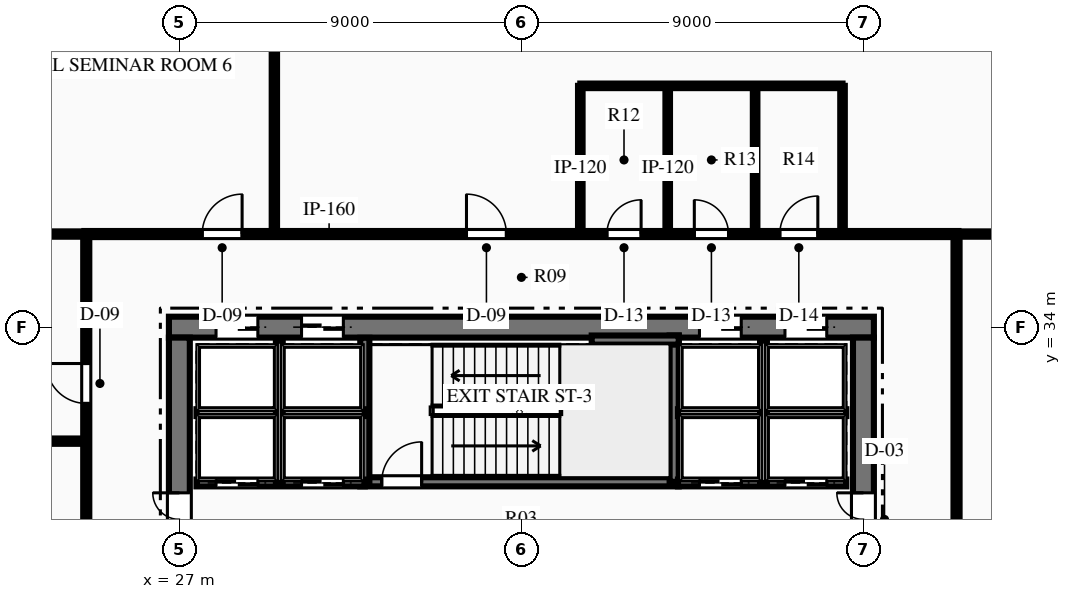
"""IFC4 building model, lengths in metres.
Left out: names, types, materials, properties, quantities, classifications, styles, units other than length and angle.
Written with IfcOpenShell. Run it as: python <this file> out.ifc"""

import sys

from ifc_helpers import new_model, si_unit, direction, frame, frame_2d, origin, place, context, subcontext, project, spatial, rectangle, extrude, element, fill, save


model = new_model("IFC4")
c1 = context("Model", 3, precision=1e-05, world=origin(), true_north=direction((0.0, 1.0)))
c2 = subcontext(c1, "Body", "Model", "MODEL_VIEW")
j1 = project(units=[si_unit("LENGTHUNIT", "METRE"), si_unit("PLANEANGLEUNIT", "RADIAN")], contexts=[c1])
p1 = place(None, origin())
s1 = spatial("IfcSite", under=j1, at=p1, CompositionType="ELEMENT")
p2 = place(p1, origin())
s2 = spatial("IfcBuilding", under=s1, at=p2, CompositionType="ELEMENT")
p3 = place(p2, frame((0.0, 0.0, 131.7)))
s3 = spatial("IfcBuildingStorey", under=s2, at=p3, CompositionType="ELEMENT", Elevation=131.7)
p4 = place(p3, frame((26.725, 34.0, 0.0), z_axis=(0.0, 0.0, 1.0), x_axis=(1.0, 0.0, 0.0)))
e1 = element("IfcWall", 1, at=p4, inside=s3, PredefinedType="SHEAR", context=c2, shape_type="SweptSolid", body=[
    extrude(rectangle(XDim=18.55, YDim=0.55, at=frame_2d((9.275, 0.0))), origin(), (0.0, 0.0, 1.0), 4.5),
])
p5 = place(p4, frame((1.24, 0.0, 0.0)))
e2 = element("IfcOpeningElement", 2, at=p5, cuts=e1, PredefinedType="OPENING", context=c2, shape_type="SweptSolid", body=[
    extrude(rectangle(XDim=1.1, YDim=2.15, at=frame_2d((0.55, 1.075))), frame((0.0, 0.285, 0.0), z_axis=(0.0, -1.0, 0.0), x_axis=(1.0, 0.0, 0.0)), (0.0, 0.0, 1.0), 0.57),
])
p6 = place(p4, frame((3.49, 0.0, 0.0)))
e3 = element("IfcOpeningElement", 3, at=p6, cuts=e1, PredefinedType="OPENING", context=c2, shape_type="SweptSolid", body=[
    extrude(rectangle(XDim=1.1, YDim=2.15, at=frame_2d((0.55, 1.075))), frame((0.0, 0.285, 0.0), z_axis=(0.0, -1.0, 0.0), x_axis=(1.0, 0.0, 0.0)), (0.0, 0.0, 1.0), 0.57),
])
p7 = place(p4, frame((13.96, 0.0, 0.0)))
e4 = element("IfcOpeningElement", 4, at=p7, cuts=e1, PredefinedType="OPENING", context=c2, shape_type="SweptSolid", body=[
    extrude(rectangle(XDim=1.1, YDim=2.15, at=frame_2d((0.55, 1.075))), frame((0.0, 0.285, 0.0), z_axis=(0.0, -1.0, 0.0), x_axis=(1.0, 0.0, 0.0)), (0.0, 0.0, 1.0), 0.57),
])
p8 = place(p4, frame((16.21, 0.0, 0.0)))
e5 = element("IfcOpeningElement", 5, at=p8, cuts=e1, PredefinedType="OPENING", context=c2, shape_type="SweptSolid", body=[
    extrude(rectangle(XDim=1.1, YDim=2.15, at=frame_2d((0.55, 1.075))), frame((0.0, 0.285, 0.0), z_axis=(0.0, -1.0, 0.0), x_axis=(1.0, 0.0, 0.0)), (0.0, 0.0, 1.0), 0.57),
])
p9 = place(p3, frame((27.0, 18.275, 0.0), z_axis=(0.0, 0.0, 1.0), x_axis=(0.0, 1.0, 0.0)))
e6 = element("IfcWall", 6, at=p9, inside=s3, PredefinedType="SHEAR", context=c2, shape_type="SweptSolid", body=[
    extrude(rectangle(XDim=15.45, YDim=0.55, at=frame_2d((7.725, 0.0))), origin(), (0.0, 0.0, 1.0), 4.5),
])
p10 = place(p9, frame((9.965, 0.0, 0.0)))
e7 = element("IfcOpeningElement", 7, at=p10, cuts=e6, PredefinedType="OPENING", context=c2, shape_type="SweptSolid", body=[
    extrude(rectangle(XDim=1.4, YDim=2.2, at=frame_2d((0.7, 1.1))), frame((0.0, 0.285, 0.0), z_axis=(0.0, -1.0, 0.0), x_axis=(1.0, 0.0, 0.0)), (0.0, 0.0, 1.0), 0.57),
])
p11 = place(p3, frame((45.0, 18.275, 0.0), z_axis=(0.0, 0.0, 1.0), x_axis=(0.0, 1.0, 0.0)))
e8 = element("IfcWall", 8, at=p11, inside=s3, PredefinedType="SHEAR", context=c2, shape_type="SweptSolid", body=[
    extrude(rectangle(XDim=15.45, YDim=0.55, at=frame_2d((7.725, 0.0))), origin(), (0.0, 0.0, 1.0), 4.5),
])
p12 = place(p11, frame((9.965, 0.0, 0.0)))
e9 = element("IfcOpeningElement", 9, at=p12, cuts=e8, PredefinedType="OPENING", context=c2, shape_type="SweptSolid", body=[
    extrude(rectangle(XDim=1.4, YDim=2.2, at=frame_2d((0.7, 1.1))), frame((0.0, 0.285, 0.0), z_axis=(0.0, -1.0, 0.0), x_axis=(1.0, 0.0, 0.0)), (0.0, 0.0, 1.0), 0.57),
])
p13 = place(p3, frame((31.76, 29.93, 0.0), z_axis=(0.0, 0.0, 1.0), x_axis=(1.0, 0.0, 0.0)))
e10 = element("IfcWall", 10, at=p13, inside=s3, PredefinedType="SHEAR", context=c2, shape_type="SweptSolid", body=[
    extrude(rectangle(XDim=8.38, YDim=0.24, at=frame_2d((4.19, 0.0))), origin(), (0.0, 0.0, 1.0), 4.5),
])
p14 = place(p13, frame((0.565, 0.0, 0.0)))
e11 = element("IfcOpeningElement", 11, at=p14, cuts=e10, PredefinedType="OPENING", context=c2, shape_type="SweptSolid", body=[
    extrude(rectangle(XDim=1.05, YDim=2.15, at=frame_2d((0.525, 1.075))), frame((0.0, 0.13, 0.0), z_axis=(0.0, -1.0, 0.0), x_axis=(1.0, 0.0, 0.0)), (0.0, 0.0, 1.0), 0.26),
])
p15 = place(p3, frame((31.88, 29.93, 0.0), z_axis=(0.0, 0.0, 1.0), x_axis=(0.0, 1.0, 0.0)))
e12 = element("IfcWall", 12, at=p15, inside=s3, PredefinedType="SHEAR", context=c2, shape_type="SweptSolid", body=[
    extrude(rectangle(XDim=3.79, YDim=0.24, at=frame_2d((1.895, 0.0))), origin(), (0.0, 0.0, 1.0), 4.5),
])
p16 = place(p3, frame((40.02, 29.93, 0.0), z_axis=(0.0, 0.0, 1.0), x_axis=(0.0, 1.0, 0.0)))
e13 = element("IfcWall", 13, at=p16, inside=s3, PredefinedType="SHEAR", context=c2, shape_type="SweptSolid", body=[
    extrude(rectangle(XDim=3.85, YDim=0.24, at=frame_2d((1.925, 0.0))), origin(), (0.0, 0.0, 1.0), 4.5),
])
p17 = place(p3, frame((37.85, 33.66, 0.0), z_axis=(0.0, 0.0, 1.0), x_axis=(1.0, 0.0, 0.0)))
e14 = element("IfcWall", 14, at=p17, inside=s3, PredefinedType="SHEAR", context=c2, shape_type="SweptSolid", body=[
    extrude(rectangle(XDim=2.29, YDim=0.24, at=frame_2d((1.145, 0.0))), origin(), (0.0, 0.0, 1.0), 4.5),
])
p18 = place(p3, frame((27.45, 29.9, 0.0), z_axis=(0.0, 0.0, 1.0), x_axis=(1.0, 0.0, 0.0)))
e15 = element("IfcWall", 15, at=p18, inside=s3, PredefinedType="PARTITIONING", context=c2, shape_type="SweptSolid", body=[
    extrude(rectangle(XDim=4.43, YDim=0.18, at=frame_2d((2.215, 0.0))), origin(), (0.0, 0.0, 1.0), 4.1),
])
p19 = place(p18, frame((0.515, 0.0, 0.0)))
e16 = element("IfcOpeningElement", 16, at=p19, cuts=e15, PredefinedType="OPENING", context=c2, shape_type="SweptSolid", body=[
    extrude(rectangle(XDim=1.1, YDim=2.15, at=frame_2d((0.55, 1.075))), frame((0.0, 0.1, 0.0), z_axis=(0.0, -1.0, 0.0), x_axis=(1.0, 0.0, 0.0)), (0.0, 0.0, 1.0), 0.2),
])
p20 = place(p18, frame((2.765, 0.0, 0.0)))
e17 = element("IfcOpeningElement", 17, at=p20, cuts=e15, PredefinedType="OPENING", context=c2, shape_type="SweptSolid", body=[
    extrude(rectangle(XDim=1.1, YDim=2.15, at=frame_2d((0.55, 1.075))), frame((0.0, 0.1, 0.0), z_axis=(0.0, -1.0, 0.0), x_axis=(1.0, 0.0, 0.0)), (0.0, 0.0, 1.0), 0.2),
])
p21 = place(p3, frame((27.45, 31.75, 0.0), z_axis=(0.0, 0.0, 1.0), x_axis=(1.0, 0.0, 0.0)))
e18 = element("IfcWall", 18, at=p21, inside=s3, PredefinedType="PARTITIONING", context=c2, shape_type="SweptSolid", body=[
    extrude(rectangle(XDim=4.43, YDim=0.18, at=frame_2d((2.215, 0.0))), origin(), (0.0, 0.0, 1.0), 4.1),
])
p22 = place(p3, frame((29.63, 29.9, 0.0), z_axis=(0.0, 0.0, 1.0), x_axis=(0.0, 1.0, 0.0)))
e19 = element("IfcWall", 19, at=p22, inside=s3, PredefinedType="PARTITIONING", context=c2, shape_type="SweptSolid", body=[
    extrude(rectangle(XDim=3.75, YDim=0.18, at=frame_2d((1.875, 0.0))), origin(), (0.0, 0.0, 1.0), 4.1),
])
p23 = place(p3, frame((40.12, 29.9, 0.0), z_axis=(0.0, 0.0, 1.0), x_axis=(1.0, 0.0, 0.0)))
e20 = element("IfcWall", 20, at=p23, inside=s3, PredefinedType="PARTITIONING", context=c2, shape_type="SweptSolid", body=[
    extrude(rectangle(XDim=4.43, YDim=0.18, at=frame_2d((2.215, 0.0))), origin(), (0.0, 0.0, 1.0), 4.1),
])
p24 = place(p23, frame((0.565, 0.0, 0.0)))
e21 = element("IfcOpeningElement", 21, at=p24, cuts=e20, PredefinedType="OPENING", context=c2, shape_type="SweptSolid", body=[
    extrude(rectangle(XDim=1.1, YDim=2.15, at=frame_2d((0.55, 1.075))), frame((0.0, 0.1, 0.0), z_axis=(0.0, -1.0, 0.0), x_axis=(1.0, 0.0, 0.0)), (0.0, 0.0, 1.0), 0.2),
])
p25 = place(p23, frame((2.815, 0.0, 0.0)))
e22 = element("IfcOpeningElement", 22, at=p25, cuts=e20, PredefinedType="OPENING", context=c2, shape_type="SweptSolid", body=[
    extrude(rectangle(XDim=1.1, YDim=2.15, at=frame_2d((0.55, 1.075))), frame((0.0, 0.1, 0.0), z_axis=(0.0, -1.0, 0.0), x_axis=(1.0, 0.0, 0.0)), (0.0, 0.0, 1.0), 0.2),
])
p26 = place(p3, frame((40.12, 31.75, 0.0), z_axis=(0.0, 0.0, 1.0), x_axis=(1.0, 0.0, 0.0)))
e23 = element("IfcWall", 23, at=p26, inside=s3, PredefinedType="PARTITIONING", context=c2, shape_type="SweptSolid", body=[
    extrude(rectangle(XDim=4.43, YDim=0.18, at=frame_2d((2.215, 0.0))), origin(), (0.0, 0.0, 1.0), 4.1),
])
p27 = place(p3, frame((42.37, 29.9, 0.0), z_axis=(0.0, 0.0, 1.0), x_axis=(0.0, 1.0, 0.0)))
e24 = element("IfcWall", 24, at=p27, inside=s3, PredefinedType="PARTITIONING", context=c2, shape_type="SweptSolid", body=[
    extrude(rectangle(XDim=3.75, YDim=0.18, at=frame_2d((1.875, 0.0))), origin(), (0.0, 0.0, 1.0), 4.1),
])
p28 = place(p3, frame((24.5, 36.45, 0.0), z_axis=(0.0, 0.0, 1.0), x_axis=(1.0, 0.0, 0.0)))
e25 = element("IfcWall", 25, at=p28, inside=s3, PredefinedType="PARTITIONING", context=c2, shape_type="SweptSolid", body=[
    extrude(rectangle(XDim=23.0, YDim=0.16, at=frame_2d((11.5, 0.0))), origin(), (0.0, 0.0, 1.0), 4.1),
])
p29 = place(p28, frame((13.75, 0.0, 0.0)))
e26 = element("IfcOpeningElement", 26, at=p29, cuts=e25, PredefinedType="OPENING", context=c2, shape_type="SweptSolid", body=[
    extrude(rectangle(XDim=0.9, YDim=2.15, at=frame_2d((0.45, 1.075))), frame((0.0, 0.09, 0.0), z_axis=(0.0, -1.0, 0.0), x_axis=(1.0, 0.0, 0.0)), (0.0, 0.0, 1.0), 0.18),
])
p30 = place(p28, frame((16.05, 0.0, 0.0)))
e27 = element("IfcOpeningElement", 27, at=p30, cuts=e25, PredefinedType="OPENING", context=c2, shape_type="SweptSolid", body=[
    extrude(rectangle(XDim=0.9, YDim=2.15, at=frame_2d((0.45, 1.075))), frame((0.0, 0.09, 0.0), z_axis=(0.0, -1.0, 0.0), x_axis=(1.0, 0.0, 0.0)), (0.0, 0.0, 1.0), 0.18),
])
p31 = place(p28, frame((18.3, 0.0, 0.0)))
e28 = element("IfcOpeningElement", 28, at=p31, cuts=e25, PredefinedType="OPENING", context=c2, shape_type="SweptSolid", body=[
    extrude(rectangle(XDim=1.0, YDim=2.15, at=frame_2d((0.5, 1.075))), frame((0.0, 0.09, 0.0), z_axis=(0.0, -1.0, 0.0), x_axis=(1.0, 0.0, 0.0)), (0.0, 0.0, 1.0), 0.18),
])
p32 = place(p28, frame((3.101, 0.0, 0.0)))
e29 = element("IfcOpeningElement", 29, at=p32, cuts=e25, PredefinedType="OPENING", context=c2, shape_type="SweptSolid", body=[
    extrude(rectangle(XDim=1.05, YDim=2.15, at=frame_2d((0.525, 1.075))), frame((0.0, 0.09, 0.0), z_axis=(0.0, -1.0, 0.0), x_axis=(1.0, 0.0, 0.0)), (0.0, 0.0, 1.0), 0.18),
])
p33 = place(p28, frame((10.055, 0.0, 0.0)))
e30 = element("IfcOpeningElement", 30, at=p33, cuts=e25, PredefinedType="OPENING", context=c2, shape_type="SweptSolid", body=[
    extrude(rectangle(XDim=1.05, YDim=2.15, at=frame_2d((0.525, 1.075))), frame((0.0, 0.09, 0.0), z_axis=(0.0, -1.0, 0.0), x_axis=(1.0, 0.0, 0.0)), (0.0, 0.0, 1.0), 0.18),
])
p34 = place(p3, frame((24.55, 15.55, 0.0), z_axis=(0.0, 0.0, 1.0), x_axis=(0.0, 1.0, 0.0)))
e31 = element("IfcWall", 31, at=p34, inside=s3, PredefinedType="PARTITIONING", context=c2, shape_type="SweptSolid", body=[
    extrude(rectangle(XDim=20.9, YDim=0.16, at=frame_2d((10.45, 0.0))), origin(), (0.0, 0.0, 1.0), 4.1),
])
p35 = place(p34, frame((5.107, 0.0, 0.0)))
e32 = element("IfcOpeningElement", 32, at=p35, cuts=e31, PredefinedType="OPENING", context=c2, shape_type="SweptSolid", body=[
    extrude(rectangle(XDim=1.05, YDim=2.15, at=frame_2d((0.525, 1.075))), frame((0.0, 0.09, 0.0), z_axis=(0.0, -1.0, 0.0), x_axis=(1.0, 0.0, 0.0)), (0.0, 0.0, 1.0), 0.18),
])
p36 = place(p34, frame((12.155, 0.0, 0.0)))
e33 = element("IfcOpeningElement", 33, at=p36, cuts=e31, PredefinedType="OPENING", context=c2, shape_type="SweptSolid", body=[
    extrude(rectangle(XDim=1.05, YDim=2.15, at=frame_2d((0.525, 1.075))), frame((0.0, 0.09, 0.0), z_axis=(0.0, -1.0, 0.0), x_axis=(1.0, 0.0, 0.0)), (0.0, 0.0, 1.0), 0.18),
])
p37 = place(p34, frame((16.443, 0.0, 0.0)))
e34 = element("IfcOpeningElement", 34, at=p37, cuts=e31, PredefinedType="OPENING", context=c2, shape_type="SweptSolid", body=[
    extrude(rectangle(XDim=1.05, YDim=2.15, at=frame_2d((0.525, 1.075))), frame((0.0, 0.09, 0.0), z_axis=(0.0, -1.0, 0.0), x_axis=(1.0, 0.0, 0.0)), (0.0, 0.0, 1.0), 0.18),
])
p38 = place(p3, frame((47.45, 15.55, 0.0), z_axis=(0.0, 0.0, 1.0), x_axis=(0.0, 1.0, 0.0)))
e35 = element("IfcWall", 35, at=p38, inside=s3, PredefinedType="PARTITIONING", context=c2, shape_type="SweptSolid", body=[
    extrude(rectangle(XDim=20.9, YDim=0.16, at=frame_2d((10.45, 0.0))), origin(), (0.0, 0.0, 1.0), 4.1),
])
p39 = place(p38, frame((7.417, 0.0, 0.0)))
e36 = element("IfcOpeningElement", 36, at=p39, cuts=e35, PredefinedType="OPENING", context=c2, shape_type="SweptSolid", body=[
    extrude(rectangle(XDim=1.05, YDim=2.15, at=frame_2d((0.525, 1.075))), frame((0.0, 0.09, 0.0), z_axis=(0.0, -1.0, 0.0), x_axis=(1.0, 0.0, 0.0)), (0.0, 0.0, 1.0), 0.18),
])
for number, where, z_axis, x_axis in (
    (37, (37.55, 36.45, 0.0), (0.0, 0.0, 1.0), (0.0, 1.0, 0.0)),
    (38, (39.85, 36.45, 0.0), (0.0, 0.0, 1.0), (0.0, 1.0, 0.0)),
    (39, (42.15, 36.45, 0.0), (0.0, 0.0, 1.0), (0.0, 1.0, 0.0)),
):
    element("IfcWall", number, at=place(p3, frame(where, z_axis=z_axis, x_axis=x_axis)), inside=s3, PredefinedType="PARTITIONING", context=c2, shape_type="SweptSolid", body=[
        extrude(rectangle(XDim=3.9, YDim=0.12, at=frame_2d((1.95, 0.0))), origin(), (0.0, 0.0, 1.0), 4.1),
    ])
p40 = place(p3, frame((44.45, 36.45, 0.0), z_axis=(0.0, 0.0, 1.0), x_axis=(0.0, 1.0, 0.0)))
e40 = element("IfcWall", 40, at=p40, inside=s3, PredefinedType="PARTITIONING", context=c2, shape_type="SweptSolid", body=[
    extrude(rectangle(XDim=3.9, YDim=0.12, at=frame_2d((1.95, 0.0))), origin(), (0.0, 0.0, 1.0), 2.595),
])
p41 = place(p3, frame((37.55, 40.35, 0.0), z_axis=(0.0, 0.0, 1.0), x_axis=(1.0, 0.0, 0.0)))
e41 = element("IfcWall", 41, at=p41, inside=s3, PredefinedType="PARTITIONING", context=c2, shape_type="SweptSolid", body=[
    extrude(rectangle(XDim=6.9, YDim=0.12, at=frame_2d((3.45, 0.0))), origin(), (0.0, 0.0, 1.0), 4.1),
])
p42 = place(p3, frame((5.838, 36.45, 0.0), z_axis=(0.0, 0.0, 1.0), x_axis=(1.0, 0.0, 0.0)))
e42 = element("IfcWall", 42, at=p42, inside=s3, PredefinedType="PARTITIONING", context=c2, shape_type="SweptSolid", body=[
    extrude(rectangle(XDim=18.712, YDim=0.14, at=frame_2d((9.356, 0.0))), origin(), (0.0, 0.0, 1.0), 4.1),
])
p43 = place(p3, frame((47.45, 36.45, 0.0), z_axis=(0.0, 0.0, 1.0), x_axis=(1.0, 0.0, 0.0)))
e43 = element("IfcWall", 43, at=p43, inside=s3, PredefinedType="PARTITIONING", context=c2, shape_type="SweptSolid", body=[
    extrude(rectangle(XDim=12.269, YDim=0.14, at=frame_2d((6.134, 0.0))), origin(), (0.0, 0.0, 1.0), 4.1),
])
p44 = place(p3, frame((29.5, 36.45, 0.0), z_axis=(0.0, 0.0, 1.0), x_axis=(0.0, 1.0, 0.0)))
e44 = element("IfcWall", 44, at=p44, inside=s3, PredefinedType="PARTITIONING", context=c2, shape_type="SweptSolid", body=[
    extrude(rectangle(XDim=14.246, YDim=0.14, at=frame_2d((7.123, 0.0))), origin(), (0.0, 0.0, 1.0), 4.1),
])
p45 = place(p3, frame((4.734, 31.0, 0.0), z_axis=(0.0, 0.0, 1.0), x_axis=(1.0, 0.0, 0.0)))
e45 = element("IfcWall", 45, at=p45, inside=s3, PredefinedType="PARTITIONING", context=c2, shape_type="SweptSolid", body=[
    extrude(rectangle(XDim=19.816, YDim=0.14, at=frame_2d((9.908, 0.0))), origin(), (0.0, 0.0, 1.0), 4.1),
])
p46 = place(p14, origin())
e46 = element("IfcDoor", 46, at=p46, inside=s3, OperationType="SINGLE_SWING_RIGHT", PredefinedType="DOOR", context=c2, shape_type="SweptSolid", body=[
    extrude(rectangle(XDim=1.05, YDim=2.15, at=frame_2d((0.525, 1.075))), frame((0.0, 0.025, 0.0), z_axis=(0.0, -1.0, 0.0), x_axis=(1.0, 0.0, 0.0)), (0.0, 0.0, 1.0), 0.05),
])
fill(e11, e46)
p47 = place(p10, origin())
e47 = element("IfcDoor", 47, at=p47, inside=s3, OperationType="DOUBLE_DOOR_SINGLE_SWING", PredefinedType="DOOR", context=c2, shape_type="SweptSolid", body=[
    extrude(rectangle(XDim=1.4, YDim=2.2, at=frame_2d((0.7, 1.1))), frame((0.0, 0.025, 0.0), z_axis=(0.0, -1.0, 0.0), x_axis=(1.0, 0.0, 0.0)), (0.0, 0.0, 1.0), 0.05),
])
fill(e7, e47)
p48 = place(p12, origin())
e48 = element("IfcDoor", 48, at=p48, inside=s3, OperationType="DOUBLE_DOOR_SINGLE_SWING", PredefinedType="DOOR", context=c2, shape_type="SweptSolid", body=[
    extrude(rectangle(XDim=1.4, YDim=2.2, at=frame_2d((0.7, 1.1))), frame((0.0, 0.025, 0.0), z_axis=(0.0, -1.0, 0.0), x_axis=(1.0, 0.0, 0.0)), (0.0, 0.0, 1.0), 0.05),
])
fill(e9, e48)
p49 = place(p29, origin())
e49 = element("IfcDoor", 49, at=p49, inside=s3, OperationType="SINGLE_SWING_RIGHT", PredefinedType="DOOR", context=c2, shape_type="SweptSolid", body=[
    extrude(rectangle(XDim=0.9, YDim=2.15, at=frame_2d((0.45, 1.075))), frame((0.0, 0.025, 0.0), z_axis=(0.0, -1.0, 0.0), x_axis=(1.0, 0.0, 0.0)), (0.0, 0.0, 1.0), 0.05),
])
fill(e26, e49)
p50 = place(p30, origin())
e50 = element("IfcDoor", 50, at=p50, inside=s3, OperationType="SINGLE_SWING_LEFT", PredefinedType="DOOR", context=c2, shape_type="SweptSolid", body=[
    extrude(rectangle(XDim=0.9, YDim=2.15, at=frame_2d((0.45, 1.075))), frame((0.0, 0.025, 0.0), z_axis=(0.0, -1.0, 0.0), x_axis=(1.0, 0.0, 0.0)), (0.0, 0.0, 1.0), 0.05),
])
fill(e27, e50)
p51 = place(p31, origin())
e51 = element("IfcDoor", 51, at=p51, inside=s3, OperationType="SINGLE_SWING_RIGHT", PredefinedType="DOOR", context=c2, shape_type="SweptSolid", body=[
    extrude(rectangle(XDim=1.0, YDim=2.15, at=frame_2d((0.5, 1.075))), frame((0.0, 0.025, 0.0), z_axis=(0.0, -1.0, 0.0), x_axis=(1.0, 0.0, 0.0)), (0.0, 0.0, 1.0), 0.05),
])
fill(e28, e51)
p52 = place(p32, origin())
e52 = element("IfcDoor", 52, at=p52, inside=s3, OperationType="SINGLE_SWING_RIGHT", PredefinedType="DOOR", context=c2, shape_type="SweptSolid", body=[
    extrude(rectangle(XDim=1.05, YDim=2.15, at=frame_2d((0.525, 1.075))), frame((0.0, 0.025, 0.0), z_axis=(0.0, -1.0, 0.0), x_axis=(1.0, 0.0, 0.0)), (0.0, 0.0, 1.0), 0.05),
])
fill(e29, e52)
p53 = place(p33, origin())
e53 = element("IfcDoor", 53, at=p53, inside=s3, OperationType="SINGLE_SWING_LEFT", PredefinedType="DOOR", context=c2, shape_type="SweptSolid", body=[
    extrude(rectangle(XDim=1.05, YDim=2.15, at=frame_2d((0.525, 1.075))), frame((0.0, 0.025, 0.0), z_axis=(0.0, -1.0, 0.0), x_axis=(1.0, 0.0, 0.0)), (0.0, 0.0, 1.0), 0.05),
])
fill(e30, e53)
p54 = place(p37, origin())
e54 = element("IfcDoor", 54, at=p54, inside=s3, OperationType="SINGLE_SWING_RIGHT", PredefinedType="DOOR", context=c2, shape_type="SweptSolid", body=[
    extrude(rectangle(XDim=1.05, YDim=2.15, at=frame_2d((0.525, 1.075))), frame((0.0, 0.025, 0.0), z_axis=(0.0, -1.0, 0.0), x_axis=(1.0, 0.0, 0.0)), (0.0, 0.0, 1.0), 0.05),
])
fill(e34, e54)
p55 = place(p19, origin())
e55 = element("IfcDoor", 55, at=p55, inside=s3, OperationType="SLIDING_TO_LEFT", PredefinedType="DOOR", context=c2, shape_type="SweptSolid", body=[
    extrude(rectangle(XDim=1.1, YDim=2.15, at=frame_2d((0.55, 1.075))), frame((0.0, 0.025, 0.0), z_axis=(0.0, -1.0, 0.0), x_axis=(1.0, 0.0, 0.0)), (0.0, 0.0, 1.0), 0.05),
])
fill(e16, e55)
p56 = place(p20, origin())
e56 = element("IfcDoor", 56, at=p56, inside=s3, OperationType="SLIDING_TO_LEFT", PredefinedType="DOOR", context=c2, shape_type="SweptSolid", body=[
    extrude(rectangle(XDim=1.1, YDim=2.15, at=frame_2d((0.55, 1.075))), frame((0.0, 0.025, 0.0), z_axis=(0.0, -1.0, 0.0), x_axis=(1.0, 0.0, 0.0)), (0.0, 0.0, 1.0), 0.05),
])
fill(e17, e56)
p57 = place(p5, origin())
e57 = element("IfcDoor", 57, at=p57, inside=s3, OperationType="SLIDING_TO_LEFT", PredefinedType="DOOR", context=c2, shape_type="SweptSolid", body=[
    extrude(rectangle(XDim=1.1, YDim=2.15, at=frame_2d((0.55, 1.075))), frame((0.0, 0.025, 0.0), z_axis=(0.0, -1.0, 0.0), x_axis=(1.0, 0.0, 0.0)), (0.0, 0.0, 1.0), 0.05),
])
fill(e2, e57)
p58 = place(p6, origin())
e58 = element("IfcDoor", 58, at=p58, inside=s3, OperationType="SLIDING_TO_LEFT", PredefinedType="DOOR", context=c2, shape_type="SweptSolid", body=[
    extrude(rectangle(XDim=1.1, YDim=2.15, at=frame_2d((0.55, 1.075))), frame((0.0, 0.025, 0.0), z_axis=(0.0, -1.0, 0.0), x_axis=(1.0, 0.0, 0.0)), (0.0, 0.0, 1.0), 0.05),
])
fill(e3, e58)
p59 = place(p24, origin())
e59 = element("IfcDoor", 59, at=p59, inside=s3, OperationType="SLIDING_TO_LEFT", PredefinedType="DOOR", context=c2, shape_type="SweptSolid", body=[
    extrude(rectangle(XDim=1.1, YDim=2.15, at=frame_2d((0.55, 1.075))), frame((0.0, 0.025, 0.0), z_axis=(0.0, -1.0, 0.0), x_axis=(1.0, 0.0, 0.0)), (0.0, 0.0, 1.0), 0.05),
])
fill(e21, e59)
p60 = place(p25, origin())
e60 = element("IfcDoor", 60, at=p60, inside=s3, OperationType="SLIDING_TO_LEFT", PredefinedType="DOOR", context=c2, shape_type="SweptSolid", body=[
    extrude(rectangle(XDim=1.1, YDim=2.15, at=frame_2d((0.55, 1.075))), frame((0.0, 0.025, 0.0), z_axis=(0.0, -1.0, 0.0), x_axis=(1.0, 0.0, 0.0)), (0.0, 0.0, 1.0), 0.05),
])
fill(e22, e60)
p61 = place(p7, origin())
e61 = element("IfcDoor", 61, at=p61, inside=s3, OperationType="SLIDING_TO_LEFT", PredefinedType="DOOR", context=c2, shape_type="SweptSolid", body=[
    extrude(rectangle(XDim=1.1, YDim=2.15, at=frame_2d((0.55, 1.075))), frame((0.0, 0.025, 0.0), z_axis=(0.0, -1.0, 0.0), x_axis=(1.0, 0.0, 0.0)), (0.0, 0.0, 1.0), 0.05),
])
fill(e4, e61)
p62 = place(p8, origin())
e62 = element("IfcDoor", 62, at=p62, inside=s3, OperationType="SLIDING_TO_LEFT", PredefinedType="DOOR", context=c2, shape_type="SweptSolid", body=[
    extrude(rectangle(XDim=1.1, YDim=2.15, at=frame_2d((0.55, 1.075))), frame((0.0, 0.025, 0.0), z_axis=(0.0, -1.0, 0.0), x_axis=(1.0, 0.0, 0.0)), (0.0, 0.0, 1.0), 0.05),
])
fill(e5, e62)
save(model, sys.argv[1])
